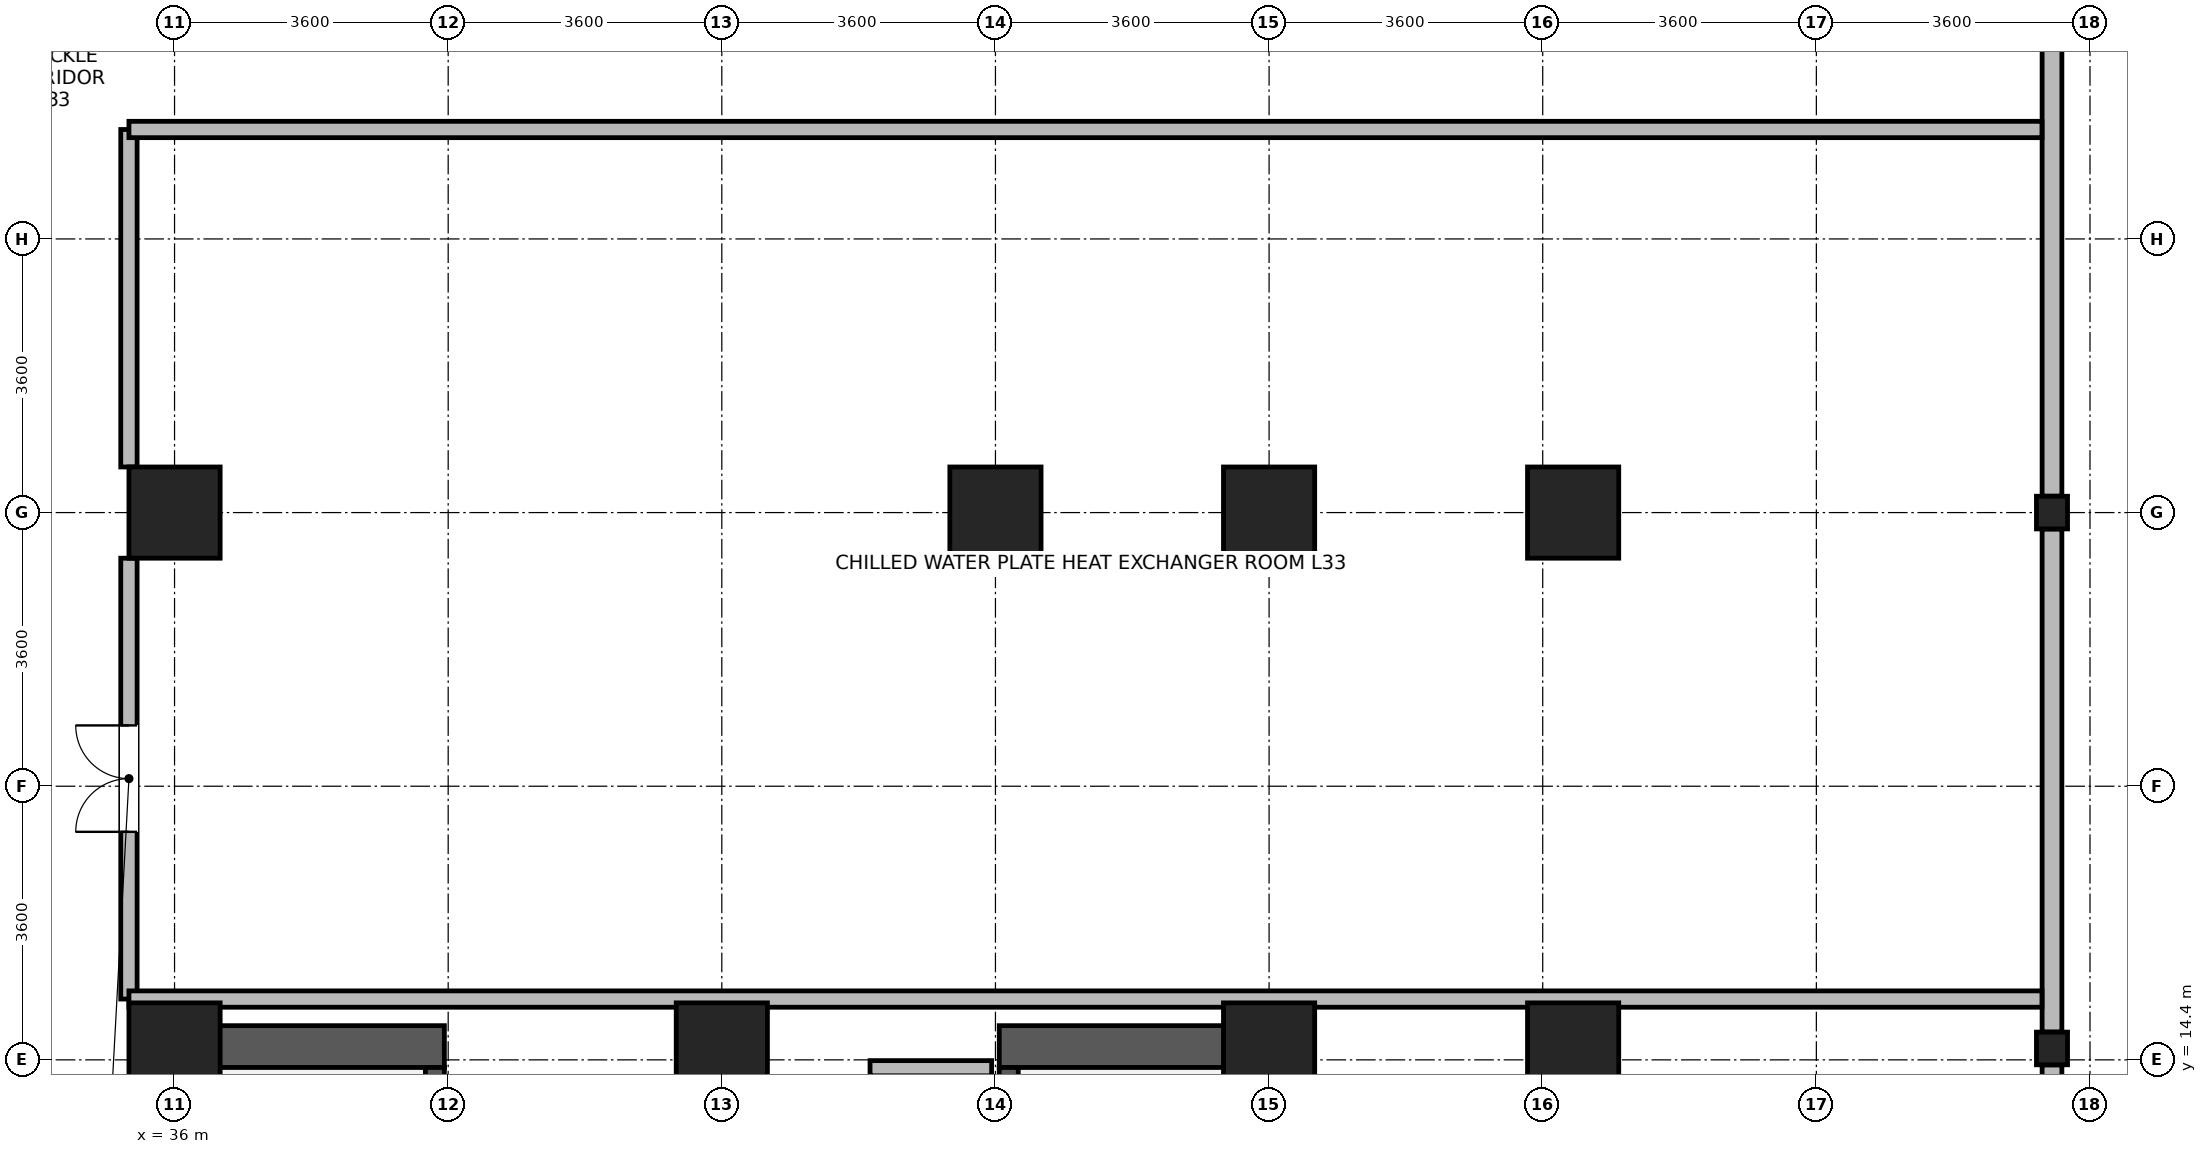
"""IFC4 building model, lengths in metres.
Left out: names, types, materials, properties, quantities, classifications, styles, units other than length and angle.
Written with IfcOpenShell. Run it as: python <this file> out.ifc"""

import sys

from ifc_helpers import new_model, si_unit, direction, frame, frame_2d, origin, origin_2d, place, context, subcontext, project, spatial, rectangle, i_section, extrude, source, transform, mapped, element, fill, save


model = new_model("IFC4")
c1 = context("Model", 3, precision=1e-05, world=origin(), true_north=direction((0.0, 1.0)))
c2 = subcontext(c1, "Body", "Model", "MODEL_VIEW")
j1 = project(units=[si_unit("LENGTHUNIT", "METRE"), si_unit("PLANEANGLEUNIT", "RADIAN")], contexts=[c1])
p1 = place(None, origin())
s1 = spatial("IfcSite", under=j1, at=p1, CompositionType="ELEMENT")
p2 = place(p1, origin())
s2 = spatial("IfcBuilding", under=s1, at=p2, CompositionType="ELEMENT")
p3 = place(p2, frame((0.0, 0.0, 130.4)))
s3 = spatial("IfcBuildingStorey", under=s2, at=p3, CompositionType="ELEMENT", Elevation=130.4)
for number, where, z_axis, x_axis in (
    (1, (36.075, 6.75, 0.0), (0.0, 0.0, 1.0), (0.0, 1.0, 0.0)),
    (2, (50.325, 6.75, 0.0), (0.0, 0.0, 1.0), (0.0, 1.0, 0.0)),
):
    element("IfcWall", number, at=place(p3, frame(where, z_axis=z_axis, x_axis=x_axis)), inside=s3, PredefinedType="SHEAR", context=c2, shape_type="SweptSolid", body=[
        extrude(rectangle(XDim=8.1, YDim=0.55, at=frame_2d((4.05, 0.0))), origin(), (0.0, 0.0, 1.0), 4.78),
    ])
for number, where, z_axis, x_axis in (
    (3, (36.35, 14.575, 0.0), (0.0, 0.0, 1.0), (1.0, 0.0, 0.0)),
    (4, (46.85, 14.575, 0.0), (0.0, 0.0, 1.0), (1.0, 0.0, 0.0)),
):
    element("IfcWall", number, at=place(p3, frame(where, z_axis=z_axis, x_axis=x_axis)), inside=s3, PredefinedType="SHEAR", context=c2, shape_type="SweptSolid", body=[
        extrude(rectangle(XDim=3.2, YDim=0.55, at=frame_2d((1.6, 0.0))), origin(), (0.0, 0.0, 1.0), 4.78),
    ])
p4 = place(p3, frame((39.425, 7.3, 0.0), z_axis=(0.0, 0.0, 1.0), x_axis=(0.0, 1.0, 0.0)))
e5 = element("IfcWall", 5, at=p4, inside=s3, PredefinedType="SHEAR", context=c2, shape_type="SweptSolid", body=[
    extrude(rectangle(XDim=7.0, YDim=0.25, at=frame_2d((3.5, 0.0))), origin(), (0.0, 0.0, 1.0), 4.78),
])
p5 = place(p4, frame((0.15, 0.0, 0.0)))
e6 = element("IfcOpeningElement", 6, at=p5, cuts=e5, PredefinedType="OPENING", context=c2, shape_type="SweptSolid", body=[
    extrude(rectangle(XDim=1.1, YDim=2.08, at=frame_2d((0.55, 1.04))), frame((0.0, 0.135, 0.0), z_axis=(0.0, -1.0, 0.0), x_axis=(1.0, 0.0, 0.0)), (0.0, 0.0, 1.0), 0.27),
])
p6 = place(p3, frame((46.975, 7.3, 0.0), z_axis=(0.0, 0.0, 1.0), x_axis=(0.0, 1.0, 0.0)))
e7 = element("IfcWall", 7, at=p6, inside=s3, PredefinedType="SHEAR", context=c2, shape_type="SweptSolid", body=[
    extrude(rectangle(XDim=7.0, YDim=0.25, at=frame_2d((3.5, 0.0))), origin(), (0.0, 0.0, 1.0), 4.78),
])
p7 = place(p6, frame((0.15, 0.0, 0.0)))
e8 = element("IfcOpeningElement", 8, at=p7, cuts=e7, PredefinedType="OPENING", context=c2, shape_type="SweptSolid", body=[
    extrude(rectangle(XDim=1.1, YDim=2.08, at=frame_2d((0.55, 1.04))), frame((0.0, 0.135, 0.0), z_axis=(0.0, -1.0, 0.0), x_axis=(1.0, 0.0, 0.0)), (0.0, 0.0, 1.0), 0.27),
])
m1 = source(origin(), c2, "Body", "SweptSolid", [
    extrude(rectangle(XDim=1.2, YDim=1.2, at=origin_2d()), origin(), (0.0, 0.0, 1.0), 5.2),
])
for number, where, z_axis, x_axis in (
    (9, (36.0, 21.6, 0.0), (0.0, 0.0, 1.0), (1.0, 0.0, 0.0)),
    (10, (46.8, 21.6, 0.0), (0.0, 0.0, 1.0), (1.0, 0.0, 0.0)),
    (11, (36.0, 14.55, 0.0), (0.0, 0.0, 1.0), (1.0, 0.0, 0.0)),
    (12, (43.2, 14.55, 0.0), (0.0, 0.0, 1.0), (1.0, 0.0, 0.0)),
    (13, (50.4, 14.55, 0.0), (0.0, 0.0, 1.0), (1.0, 0.0, 0.0)),
    (14, (50.4, 21.6, 0.0), (0.0, 0.0, 1.0), (1.0, 0.0, 0.0)),
    (15, (54.4, 14.55, 0.0), (0.0, 0.0, 1.0), (1.0, 0.0, 0.0)),
    (16, (54.4, 21.6, 0.0), (0.0, 0.0, 1.0), (1.0, 0.0, 0.0)),
):
    element("IfcColumn", number, at=place(p3, frame(where, z_axis=z_axis, x_axis=x_axis)), inside=s3, PredefinedType="COLUMN", context=c2, shape_type="MappedRepresentation", body=[
        mapped(m1, transform((0.0, 0.0, 0.0), x_axis=(1.0, 0.0, 0.0), y_axis=(0.0, 1.0, 0.0), z_axis=(0.0, 0.0, 1.0), scale=1.0)),
    ])
m2 = source(origin(), c2, "Body", "SweptSolid", [
    extrude(i_section(OverallWidth=0.409, OverallDepth=0.43, WebThickness=0.024, FlangeThickness=0.033, FilletRadius=0.015, at=origin_2d()), origin(), (0.0, 0.0, 1.0), 5.2),
])
for number, where, z_axis, x_axis in (
    (17, (60.7, 14.55, 0.0), (0.0, 0.0, 1.0), (1.0, 0.0, 0.0)),
    (18, (60.7, 21.6, 0.0), (0.0, 0.0, 1.0), (1.0, 0.0, 0.0)),
):
    element("IfcColumn", number, at=place(p3, frame(where, z_axis=z_axis, x_axis=x_axis)), inside=s3, PredefinedType="COLUMN", context=c2, shape_type="MappedRepresentation", body=[
        mapped(m2, transform((0.0, 0.0, 0.0), x_axis=(1.0, 0.0, 0.0), y_axis=(0.0, 1.0, 0.0), z_axis=(0.0, 0.0, 1.0), scale=1.0)),
    ])
p8 = place(p3, frame((60.7, 14.334, 0.0), z_axis=(0.0, 0.0, 1.0), x_axis=(0.0, -1.0, 0.0)))
e19 = element("IfcWall", 19, at=p8, inside=s3, PredefinedType="STANDARD", context=c2, shape_type="SweptSolid", body=[
    extrude(rectangle(XDim=7.068, YDim=0.26, at=frame_2d((3.534, 0.0))), origin(), (0.0, 0.0, 1.0), 2.96),
])
p9 = place(p3, frame((60.7, 21.384, 0.0), z_axis=(0.0, 0.0, 1.0), x_axis=(0.0, -1.0, 0.0)))
e20 = element("IfcWall", 20, at=p9, inside=s3, PredefinedType="STANDARD", context=c2, shape_type="SweptSolid", body=[
    extrude(rectangle(XDim=6.618, YDim=0.26, at=frame_2d((3.309, 0.0))), origin(), (0.0, 0.0, 1.0), 2.96),
])
p10 = place(p3, frame((60.7, 28.434, 0.0), z_axis=(0.0, 0.0, 1.0), x_axis=(0.0, -1.0, 0.0)))
e21 = element("IfcWall", 21, at=p10, inside=s3, PredefinedType="STANDARD", context=c2, shape_type="SweptSolid", body=[
    extrude(rectangle(XDim=6.618, YDim=0.26, at=frame_2d((3.309, 0.0))), origin(), (0.0, 0.0, 1.0), 2.96),
])
p11 = place(p3, frame((45.15, 14.29, 0.0), z_axis=(0.0, 0.0, 1.0), x_axis=(1.0, 0.0, 0.0)))
e22 = element("IfcWall", 22, at=p11, inside=s3, PredefinedType="PARTITIONING", context=c2, shape_type="SweptSolid", body=[
    extrude(rectangle(XDim=1.6, YDim=0.2, at=frame_2d((0.8, 0.0))), origin(), (0.0, 0.0, 1.0), 3.76),
])
p12 = place(p3, frame((35.4, 15.2, 0.0), z_axis=(0.0, 0.0, 1.0), x_axis=(0.0, 1.0, 0.0)))
e23 = element("IfcWall", 23, at=p12, inside=s3, PredefinedType="PARTITIONING", context=c2, shape_type="SweptSolid", body=[
    extrude(rectangle(XDim=5.8, YDim=0.215, at=frame_2d((2.9, 0.0))), origin(), (0.0, 0.0, 1.0), 4.76),
])
p13 = place(p12, frame((2.2, 0.0, 0.0)))
e24 = element("IfcOpeningElement", 24, at=p13, cuts=e23, PredefinedType="OPENING", context=c2, shape_type="SweptSolid", body=[
    extrude(rectangle(XDim=1.4, YDim=2.15, at=frame_2d((0.7, 1.075))), frame((0.0, 0.118, 0.0), z_axis=(0.0, -1.0, 0.0), x_axis=(1.0, 0.0, 0.0)), (0.0, 0.0, 1.0), 0.235),
])
p14 = place(p3, frame((35.4, 22.2, 0.0), z_axis=(0.0, 0.0, 1.0), x_axis=(0.0, 1.0, 0.0)))
e25 = element("IfcWall", 25, at=p14, inside=s3, PredefinedType="PARTITIONING", context=c2, shape_type="SweptSolid", body=[
    extrude(rectangle(XDim=4.44, YDim=0.215, at=frame_2d((2.22, 0.0))), origin(), (0.0, 0.0, 1.0), 4.76),
])
for number, where, z_axis, x_axis in (
    (26, (35.4, 15.2, 0.0), (0.0, 0.0, 1.0), (1.0, 0.0, 0.0)),
    (27, (35.4, 26.64, 0.0), (0.0, 0.0, 1.0), (1.0, 0.0, 0.0)),
):
    element("IfcWall", number, at=place(p3, frame(where, z_axis=z_axis, x_axis=x_axis)), inside=s3, PredefinedType="PARTITIONING", context=c2, shape_type="SweptSolid", body=[
        extrude(rectangle(XDim=25.168, YDim=0.215, at=frame_2d((12.584, 0.0))), origin(), (0.0, 0.0, 1.0), 4.76),
    ])
p15 = place(p13, origin())
e28 = element("IfcDoor", 28, at=p15, inside=s3, OperationType="DOUBLE_DOOR_SINGLE_SWING", PredefinedType="DOOR", context=c2, shape_type="SweptSolid", body=[
    extrude(rectangle(XDim=1.4, YDim=2.15, at=frame_2d((0.7, 1.075))), frame((0.0, 0.025, 0.0), z_axis=(0.0, -1.0, 0.0), x_axis=(1.0, 0.0, 0.0)), (0.0, 0.0, 1.0), 0.05),
])
fill(e24, e28)
save(model, sys.argv[1])
